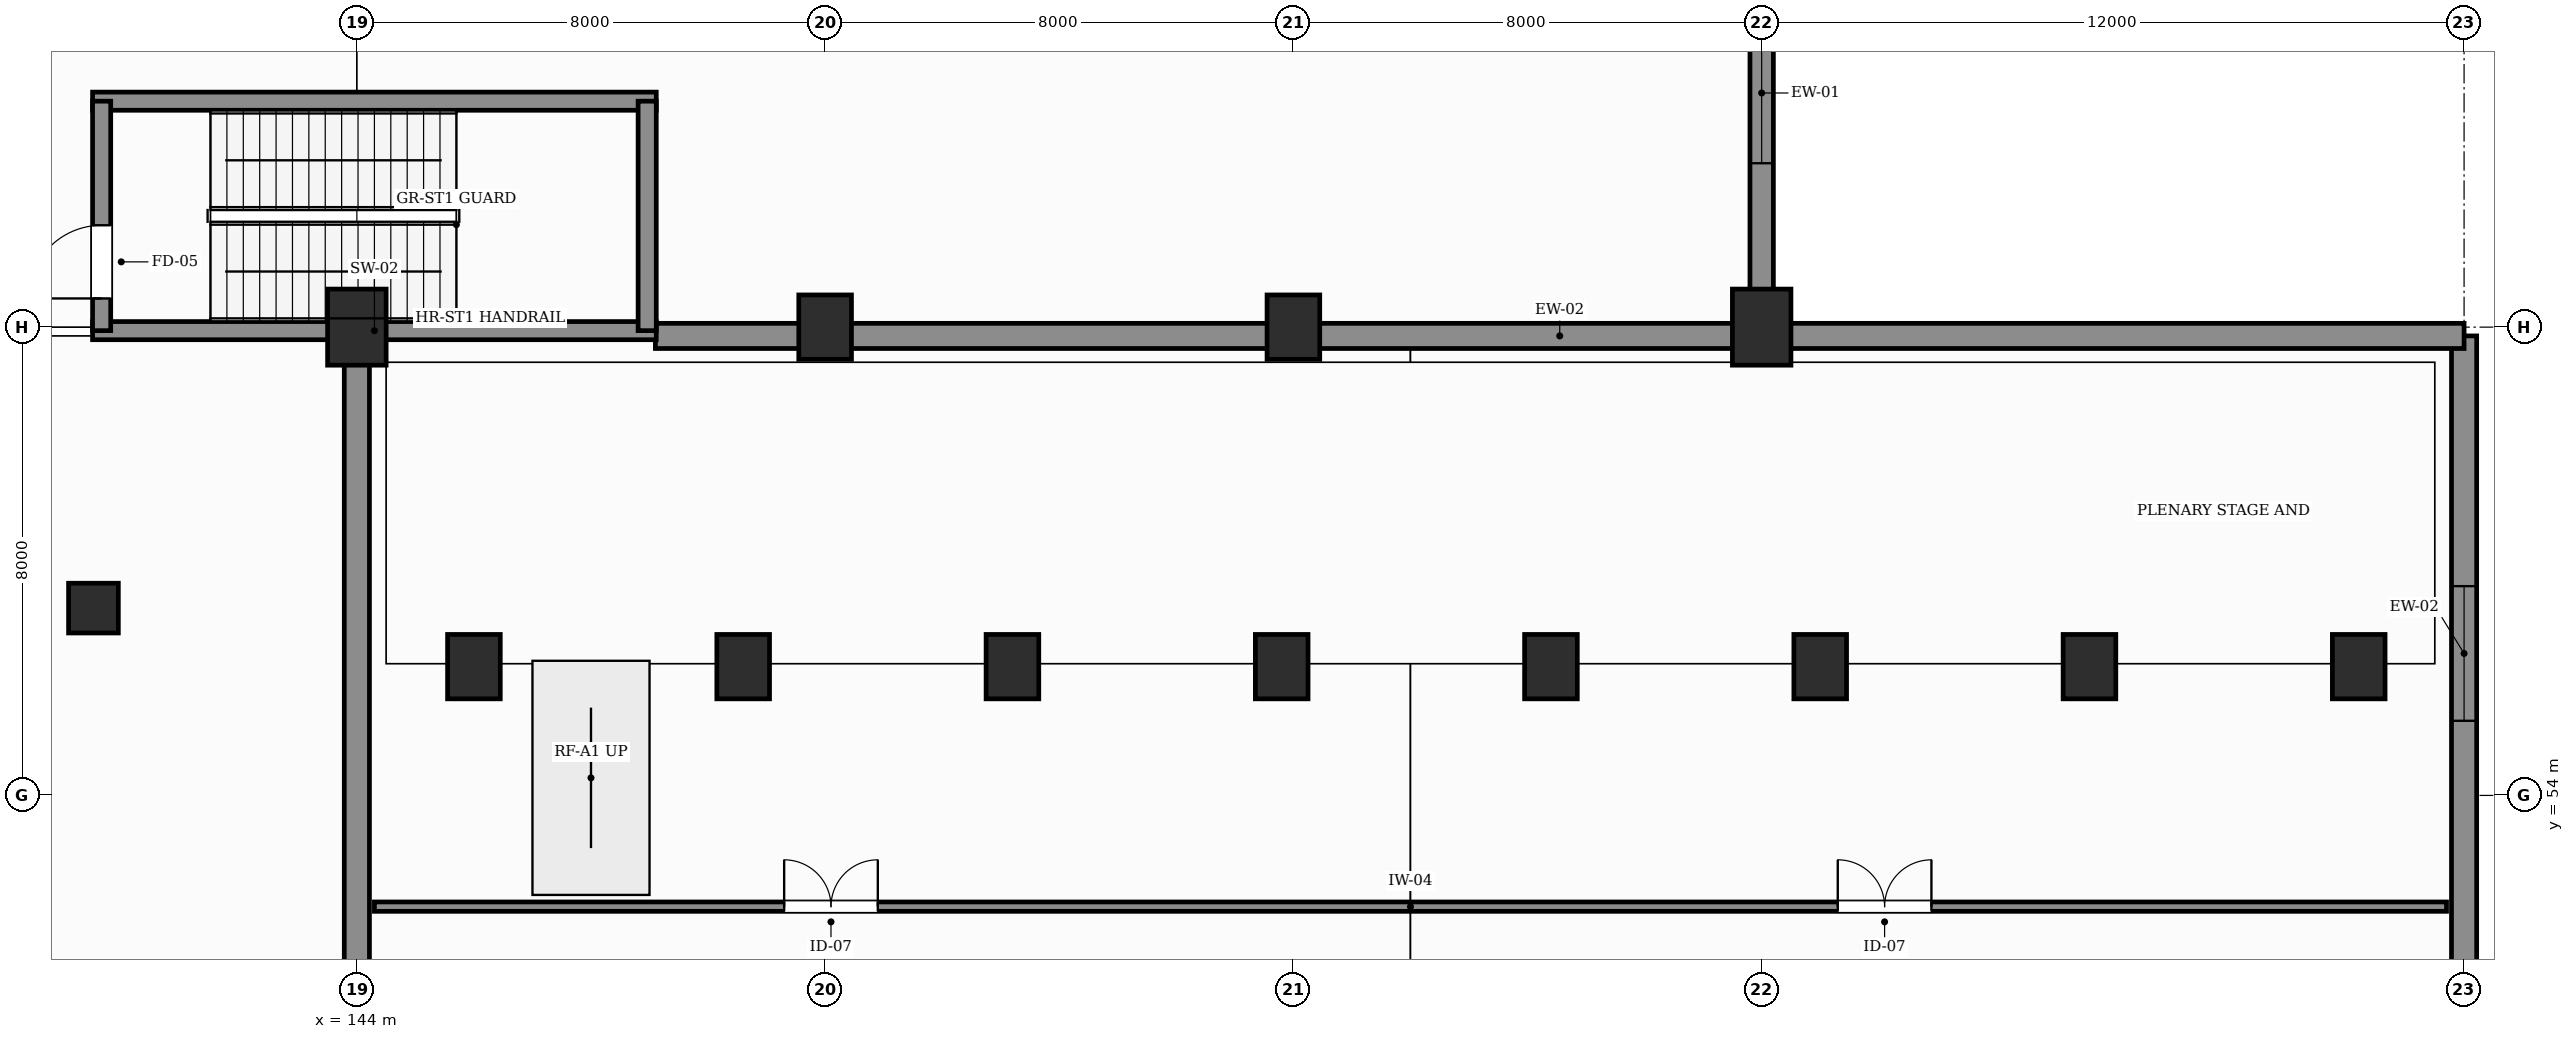
"""IFC4 building model, lengths in metres.
Left out: names, types, materials, properties, quantities, classifications, styles, units other than length and angle.
Written with IfcOpenShell. Run it as: python <this file> out.ifc"""

import sys

from ifc_helpers import new_model, si_unit, direction, frame, frame_2d, origin, origin_2d, place, context, subcontext, project, spatial, rectangle, extrude, element, fill, save


model = new_model("IFC4")
c1 = context("Model", 3, precision=1e-05, world=origin(), true_north=direction((0.0, 1.0)))
c2 = subcontext(c1, "Body", "Model", "MODEL_VIEW")
j1 = project(units=[si_unit("LENGTHUNIT", "METRE"), si_unit("PLANEANGLEUNIT", "RADIAN")], contexts=[c1])
p1 = place(None, origin())
s1 = spatial("IfcSite", under=j1, at=p1, CompositionType="ELEMENT")
p2 = place(p1, origin())
s2 = spatial("IfcBuilding", under=s1, at=p2, CompositionType="ELEMENT")
p3 = place(p2, origin())
s3 = spatial("IfcBuildingStorey", under=s2, at=p3, CompositionType="ELEMENT", Elevation=0.0)
p4 = place(p3, frame((139.5, 57.2, 0.0), z_axis=(0.0, 0.0, 1.0), x_axis=(1.0, 0.0, 0.0)))
e1 = element("IfcColumn", 1, at=p4, inside=s3, PredefinedType="COLUMN", context=c2, shape_type="SweptSolid", body=[
    extrude(rectangle(XDim=0.85, YDim=0.85, at=origin_2d()), origin(), (0.0, 0.0, 1.0), 6.0),
])
p5 = place(p3, frame((144.0, 62.0, 0.0), z_axis=(0.0, 0.0, 1.0), x_axis=(1.0, 0.0, 0.0)))
e2 = element("IfcColumn", 2, at=p5, inside=s3, PredefinedType="COLUMN", context=c2, shape_type="SweptSolid", body=[
    extrude(rectangle(XDim=1.0, YDim=1.3, at=origin_2d()), origin(), (0.0, 0.0, 1.0), 6.0),
])
for number, where, z_axis, x_axis in (
    (3, (146.0, 56.2, 0.0), (0.0, 0.0, 1.0), (1.0, 0.0, 0.0)),
    (4, (150.6, 56.2, 0.0), (0.0, 0.0, 1.0), (1.0, 0.0, 0.0)),
    (5, (152.0, 62.0, 0.0), (0.0, 0.0, 1.0), (1.0, 0.0, 0.0)),
    (6, (155.2, 56.2, 0.0), (0.0, 0.0, 1.0), (1.0, 0.0, 0.0)),
    (7, (159.8, 56.2, 0.0), (0.0, 0.0, 1.0), (1.0, 0.0, 0.0)),
    (8, (160.0, 62.0, 0.0), (0.0, 0.0, 1.0), (1.0, 0.0, 0.0)),
    (9, (164.4, 56.2, 0.0), (0.0, 0.0, 1.0), (1.0, 0.0, 0.0)),
):
    element("IfcColumn", number, at=place(p3, frame(where, z_axis=z_axis, x_axis=x_axis)), inside=s3, PredefinedType="COLUMN", context=c2, shape_type="SweptSolid", body=[
        extrude(rectangle(XDim=0.9, YDim=1.1, at=origin_2d()), origin(), (0.0, 0.0, 1.0), 6.0),
    ])
p6 = place(p3, frame((168.0, 62.0, 0.0), z_axis=(0.0, 0.0, 1.0), x_axis=(1.0, 0.0, 0.0)))
e10 = element("IfcColumn", 10, at=p6, inside=s3, PredefinedType="COLUMN", context=c2, shape_type="SweptSolid", body=[
    extrude(rectangle(XDim=1.0, YDim=1.3, at=origin_2d()), origin(), (0.0, 0.0, 1.0), 6.0),
])
for number, where, z_axis, x_axis in (
    (11, (169.0, 56.2, 0.0), (0.0, 0.0, 1.0), (1.0, 0.0, 0.0)),
    (12, (173.6, 56.2, 0.0), (0.0, 0.0, 1.0), (1.0, 0.0, 0.0)),
    (13, (178.2, 56.2, 0.0), (0.0, 0.0, 1.0), (1.0, 0.0, 0.0)),
):
    element("IfcColumn", number, at=place(p3, frame(where, z_axis=z_axis, x_axis=x_axis)), inside=s3, PredefinedType="COLUMN", context=c2, shape_type="SweptSolid", body=[
        extrude(rectangle(XDim=0.9, YDim=1.1, at=origin_2d()), origin(), (0.0, 0.0, 1.0), 6.0),
    ])
p7 = place(p3, frame((168.0, 62.5, 0.0), z_axis=(0.0, 0.0, 1.0), x_axis=(0.0, 1.0, 0.0)))
e14 = element("IfcWall", 14, at=p7, inside=s3, PredefinedType="SOLIDWALL", context=c2, shape_type="SweptSolid", body=[
    extrude(rectangle(XDim=7.0, YDim=0.4, at=frame_2d((3.5, 0.0))), origin(), (0.0, 0.0, 1.0), 6.0),
])
p8 = place(p7, frame((2.3, 0.0, 1.2)))
e15 = element("IfcOpeningElement", 15, at=p8, cuts=e14, PredefinedType="OPENING", context=c2, shape_type="SweptSolid", body=[
    extrude(rectangle(XDim=2.4, YDim=1.8, at=frame_2d((1.2, 0.9))), frame((0.0, 0.21, 0.0), z_axis=(0.0, -1.0, 0.0), x_axis=(1.0, 0.0, 0.0)), (0.0, 0.0, 1.0), 0.42),
])
p9 = place(p3, frame((180.0, 51.0, 0.0), z_axis=(0.0, 0.0, 1.0), x_axis=(0.0, 1.0, 0.0)))
e16 = element("IfcWall", 16, at=p9, inside=s3, PredefinedType="SOLIDWALL", context=c2, shape_type="SweptSolid", body=[
    extrude(rectangle(XDim=10.85, YDim=0.43, at=frame_2d((5.425, 0.0))), origin(), (0.0, 0.0, 1.0), 6.0),
])
p10 = place(p9, frame((4.275, 0.0, 1.2)))
e17 = element("IfcOpeningElement", 17, at=p10, cuts=e16, PredefinedType="OPENING", context=c2, shape_type="SweptSolid", body=[
    extrude(rectangle(XDim=2.3, YDim=1.55, at=frame_2d((1.15, 0.775))), frame((0.0, 0.225, 0.0), z_axis=(0.0, -1.0, 0.0), x_axis=(1.0, 0.0, 0.0)), (0.0, 0.0, 1.0), 0.45),
])
p11 = place(p3, frame((149.1, 61.85, 0.0), z_axis=(0.0, 0.0, 1.0), x_axis=(1.0, 0.0, 0.0)))
e18 = element("IfcWall", 18, at=p11, inside=s3, PredefinedType="SOLIDWALL", context=c2, shape_type="SweptSolid", body=[
    extrude(rectangle(XDim=30.9, YDim=0.43, at=frame_2d((15.45, 0.0))), origin(), (0.0, 0.0, 1.0), 6.0),
])
p12 = place(p3, frame((144.0, 48.0, 0.0), z_axis=(0.0, 0.0, 1.0), x_axis=(0.0, 1.0, 0.0)))
e19 = element("IfcWall", 19, at=p12, inside=s3, PredefinedType="SOLIDWALL", context=c2, shape_type="SweptSolid", body=[
    extrude(rectangle(XDim=13.85, YDim=0.43, at=frame_2d((6.925, 0.0))), origin(), (0.0, 0.0, 1.0), 6.0),
])
for number, where, z_axis, x_axis in (
    (20, (139.485, 61.94, 0.0), (0.0, 0.0, 1.0), (1.0, 0.0, 0.0)),
    (21, (139.485, 65.86, 0.0), (0.0, 0.0, 1.0), (1.0, 0.0, 0.0)),
):
    element("IfcWall", number, at=place(p3, frame(where, z_axis=z_axis, x_axis=x_axis)), inside=s3, PredefinedType="SHEAR", context=c2, shape_type="SweptSolid", body=[
        extrude(rectangle(XDim=9.63, YDim=0.31, at=frame_2d((4.815, 0.0))), origin(), (0.0, 0.0, 1.0), 6.0),
    ])
p13 = place(p3, frame((139.64, 61.94, 0.0), z_axis=(0.0, 0.0, 1.0), x_axis=(0.0, 1.0, 0.0)))
e22 = element("IfcWall", 22, at=p13, inside=s3, PredefinedType="SHEAR", context=c2, shape_type="SweptSolid", body=[
    extrude(rectangle(XDim=3.92, YDim=0.31, at=frame_2d((1.96, 0.0))), origin(), (0.0, 0.0, 1.0), 6.0),
])
p14 = place(p13, frame((0.55, 0.0, 0.0)))
e23 = element("IfcOpeningElement", 23, at=p14, cuts=e22, PredefinedType="OPENING", context=c2, shape_type="SweptSolid", body=[
    extrude(rectangle(XDim=1.25, YDim=2.2, at=frame_2d((0.625, 1.1))), frame((0.0, 0.165, 0.0), z_axis=(0.0, -1.0, 0.0), x_axis=(1.0, 0.0, 0.0)), (0.0, 0.0, 1.0), 0.33),
])
p15 = place(p3, frame((148.96, 61.94, 0.0), z_axis=(0.0, 0.0, 1.0), x_axis=(0.0, 1.0, 0.0)))
e24 = element("IfcWall", 24, at=p15, inside=s3, PredefinedType="SHEAR", context=c2, shape_type="SweptSolid", body=[
    extrude(rectangle(XDim=3.92, YDim=0.31, at=frame_2d((1.96, 0.0))), origin(), (0.0, 0.0, 1.0), 6.0),
])
p16 = place(p3, frame((144.3, 52.1, 0.0), z_axis=(0.0, 0.0, 1.0), x_axis=(1.0, 0.0, 0.0)))
e25 = element("IfcWall", 25, at=p16, inside=s3, PredefinedType="PARTITIONING", context=c2, shape_type="SweptSolid", body=[
    extrude(rectangle(XDim=35.4, YDim=0.16, at=frame_2d((17.7, 0.0))), origin(), (0.0, 0.0, 1.0), 4.65),
])
p17 = place(p16, frame((7.0, 0.0, 0.0)))
e26 = element("IfcOpeningElement", 26, at=p17, cuts=e25, PredefinedType="OPENING", context=c2, shape_type="SweptSolid", body=[
    extrude(rectangle(XDim=1.6, YDim=2.3, at=frame_2d((0.8, 1.15))), frame((0.0, 0.09, 0.0), z_axis=(0.0, -1.0, 0.0), x_axis=(1.0, 0.0, 0.0)), (0.0, 0.0, 1.0), 0.18),
])
p18 = place(p16, frame((25.0, 0.0, 0.0)))
e27 = element("IfcOpeningElement", 27, at=p18, cuts=e25, PredefinedType="OPENING", context=c2, shape_type="SweptSolid", body=[
    extrude(rectangle(XDim=1.6, YDim=2.3, at=frame_2d((0.8, 1.15))), frame((0.0, 0.09, 0.0), z_axis=(0.0, -1.0, 0.0), x_axis=(1.0, 0.0, 0.0)), (0.0, 0.0, 1.0), 0.18),
])
p19 = place(p8, origin())
e28 = element("IfcWindow", 28, at=p19, inside=s3, PartitioningType="SINGLE_PANEL", PredefinedType="WINDOW", context=c2, shape_type="SweptSolid", body=[
    extrude(rectangle(XDim=2.4, YDim=1.8, at=frame_2d((1.2, 0.9))), frame((0.0, 0.03, 0.0), z_axis=(0.0, -1.0, 0.0), x_axis=(1.0, 0.0, 0.0)), (0.0, 0.0, 1.0), 0.06),
])
fill(e15, e28)
p20 = place(p10, origin())
e29 = element("IfcWindow", 29, at=p20, inside=s3, PartitioningType="SINGLE_PANEL", PredefinedType="WINDOW", context=c2, shape_type="SweptSolid", body=[
    extrude(rectangle(XDim=2.3, YDim=1.55, at=frame_2d((1.15, 0.775))), frame((0.0, 0.03, 0.0), z_axis=(0.0, -1.0, 0.0), x_axis=(1.0, 0.0, 0.0)), (0.0, 0.0, 1.0), 0.06),
])
fill(e17, e29)
p21 = place(p14, origin())
e30 = element("IfcDoor", 30, at=p21, inside=s3, OperationType="SINGLE_SWING_LEFT", PredefinedType="DOOR", context=c2, shape_type="SweptSolid", body=[
    extrude(rectangle(XDim=1.25, YDim=2.2, at=frame_2d((0.625, 1.1))), frame((0.0, 0.025, 0.0), z_axis=(0.0, -1.0, 0.0), x_axis=(1.0, 0.0, 0.0)), (0.0, 0.0, 1.0), 0.05),
])
fill(e23, e30)
p22 = place(p17, origin())
e31 = element("IfcDoor", 31, at=p22, inside=s3, OperationType="DOUBLE_DOOR_SINGLE_SWING", PredefinedType="DOOR", context=c2, shape_type="SweptSolid", body=[
    extrude(rectangle(XDim=1.6, YDim=2.3, at=frame_2d((0.8, 1.15))), frame((0.0, 0.025, 0.0), z_axis=(0.0, -1.0, 0.0), x_axis=(1.0, 0.0, 0.0)), (0.0, 0.0, 1.0), 0.05),
])
fill(e26, e31)
p23 = place(p18, origin())
e32 = element("IfcDoor", 32, at=p23, inside=s3, OperationType="DOUBLE_DOOR_SINGLE_SWING", PredefinedType="DOOR", context=c2, shape_type="SweptSolid", body=[
    extrude(rectangle(XDim=1.6, YDim=2.3, at=frame_2d((0.8, 1.15))), frame((0.0, 0.025, 0.0), z_axis=(0.0, -1.0, 0.0), x_axis=(1.0, 0.0, 0.0)), (0.0, 0.0, 1.0), 0.05),
])
fill(e27, e32)
save(model, sys.argv[1])
